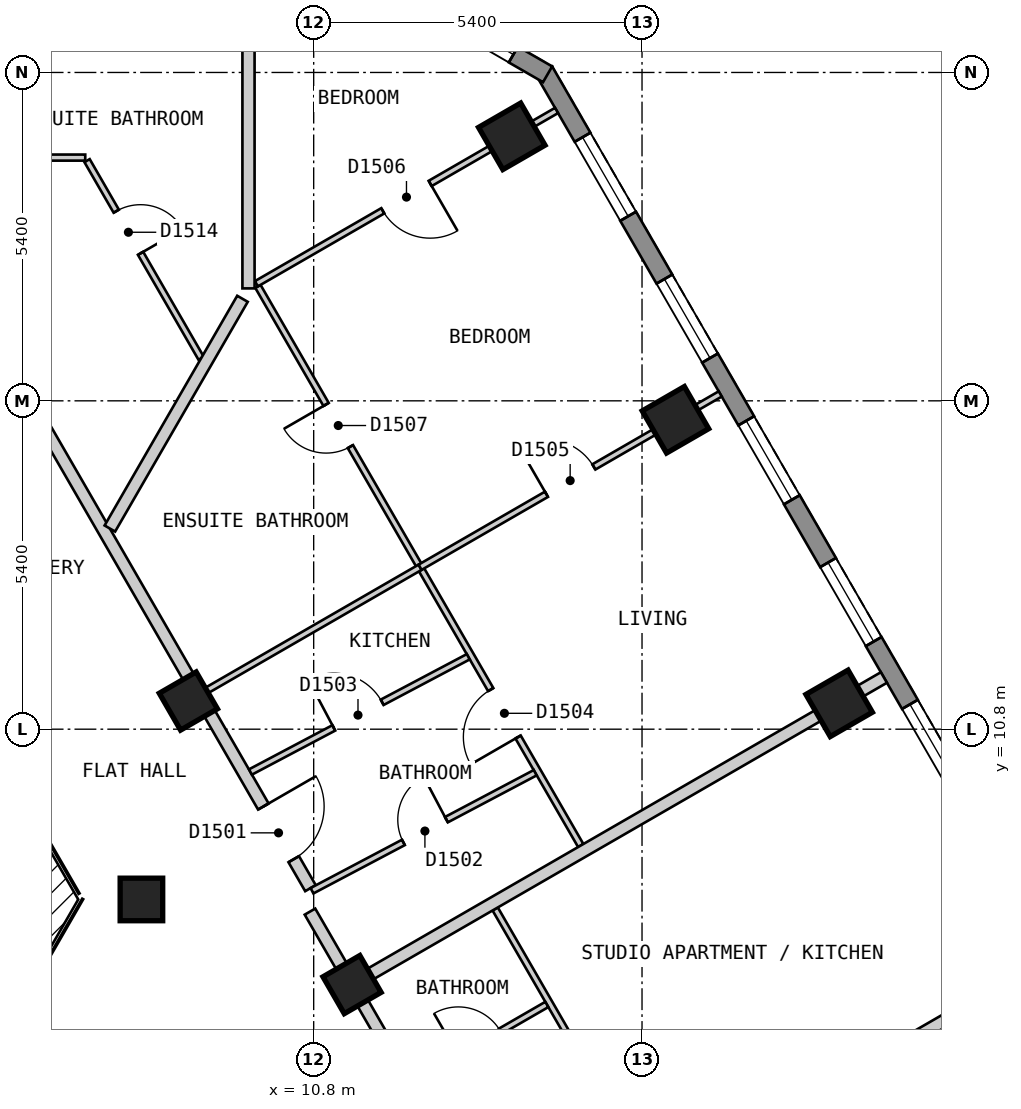
"""IFC4 building model, lengths in metres.
Left out: names, types, materials, properties, quantities, classifications, styles, units other than length and angle.
Written with IfcOpenShell. Run it as: python <this file> out.ifc"""

import sys

from ifc_helpers import new_model, si_unit, direction, frame, frame_2d, origin, origin_2d, place, context, subcontext, project, spatial, polyline, rectangle, outline, extrude, element, fill, save


model = new_model("IFC4")
c1 = context("Model", 3, precision=1e-05, world=origin(), true_north=direction((0.0, 1.0)))
c2 = subcontext(c1, "Body", "Model", "MODEL_VIEW")
j1 = project(units=[si_unit("LENGTHUNIT", "METRE"), si_unit("PLANEANGLEUNIT", "RADIAN")], contexts=[c1])
p1 = place(None, origin())
s1 = spatial("IfcSite", under=j1, at=p1, CompositionType="ELEMENT")
p2 = place(p1, origin())
s2 = spatial("IfcBuilding", under=s1, at=p2, CompositionType="ELEMENT")
p3 = place(p2, frame((0.0, 0.0, 190.2)))
s3 = spatial("IfcBuildingStorey", under=s2, at=p3, CompositionType="ELEMENT", Elevation=190.2)
for number, where, z_axis, x_axis in (
    (1, (19.442, 11.225, 0.0), (0.0, 0.0, 1.0), (-0.5, 0.866, 0.0)),
    (2, (16.75, 15.888, 0.0), (0.0, 0.0, 1.0), (-0.5, 0.866, 0.0)),
    (3, (14.058, 20.55, 0.0), (0.0, 0.0, 1.0), (-0.5, 0.866, 0.0)),
):
    element("IfcColumn", number, at=place(p3, frame(where, z_axis=z_axis, x_axis=x_axis)), inside=s3, PredefinedType="COLUMN", context=c2, shape_type="SweptSolid", body=[
        extrude(rectangle(XDim=0.8, YDim=0.8, at=origin_2d()), origin(), (0.0, 0.0, 1.0), 3.0),
    ])
for number, where, z_axis, x_axis in (
    (4, (11.431, 6.6, 0.0), (0.0, 0.0, 1.0), (-0.5, 0.866, 0.0)),
    (5, (7.967, 8.0, 0.0), (0.0, 0.0, 1.0), (1.0, 0.0, 0.0)),
    (6, (8.739, 11.263, 0.0), (0.0, 0.0, 1.0), (-0.5, 0.866, 0.0)),
):
    element("IfcColumn", number, at=place(p3, frame(where, z_axis=z_axis, x_axis=x_axis)), inside=s3, PredefinedType="COLUMN", context=c2, shape_type="SweptSolid", body=[
        extrude(rectangle(XDim=0.7, YDim=0.7, at=origin_2d()), origin(), (0.0, 0.0, 1.0), 3.0),
    ])
p4 = place(p3, frame((26.024, 1.825, 0.0), z_axis=(0.0, 0.0, 1.0), x_axis=(-0.500010537973, 0.866019319597, 0.0)))
e7 = element("IfcWall", 7, at=p4, inside=s3, PredefinedType="SOLIDWALL", context=c2, shape_type="SweptSolid", body=[
    extrude(outline(polyline([(0.0, -0.15), (22.863, -0.15), (22.783, 0.15), (0.08, 0.15), (0.0, -0.15)])), origin(), (0.0, 0.0, 1.0), 2.7),
])
p5 = place(p4, frame((1.259, 0.0, 0.15)))
e8 = element("IfcOpeningElement", 8, at=p5, cuts=e7, PredefinedType="OPENING", context=c2, shape_type="SweptSolid", body=[
    extrude(rectangle(XDim=1.5, YDim=2.1, at=frame_2d((0.75, 1.05))), frame((0.0, 0.16, 0.0), z_axis=(0.0, -1.0, 0.0), x_axis=(1.0, 0.0, 0.0)), (0.0, 0.0, 1.0), 0.32),
])
p6 = place(p4, frame((3.952, 0.0, 0.15)))
e9 = element("IfcOpeningElement", 9, at=p6, cuts=e7, PredefinedType="OPENING", context=c2, shape_type="SweptSolid", body=[
    extrude(rectangle(XDim=1.5, YDim=2.1, at=frame_2d((0.75, 1.05))), frame((0.0, 0.16, 0.0), z_axis=(0.0, -1.0, 0.0), x_axis=(1.0, 0.0, 0.0)), (0.0, 0.0, 1.0), 0.32),
])
p7 = place(p4, frame((6.644, 0.0, 0.15)))
e10 = element("IfcOpeningElement", 10, at=p7, cuts=e7, PredefinedType="OPENING", context=c2, shape_type="SweptSolid", body=[
    extrude(rectangle(XDim=1.5, YDim=2.1, at=frame_2d((0.75, 1.05))), frame((0.0, 0.16, 0.0), z_axis=(0.0, -1.0, 0.0), x_axis=(1.0, 0.0, 0.0)), (0.0, 0.0, 1.0), 0.32),
])
p8 = place(p4, frame((9.335, 0.0, 0.15)))
e11 = element("IfcOpeningElement", 11, at=p8, cuts=e7, PredefinedType="OPENING", context=c2, shape_type="SweptSolid", body=[
    extrude(rectangle(XDim=1.5, YDim=2.1, at=frame_2d((0.75, 1.05))), frame((0.0, 0.16, 0.0), z_axis=(0.0, -1.0, 0.0), x_axis=(1.0, 0.0, 0.0)), (0.0, 0.0, 1.0), 0.32),
])
p9 = place(p4, frame((12.028, 0.0, 0.15)))
e12 = element("IfcOpeningElement", 12, at=p9, cuts=e7, PredefinedType="OPENING", context=c2, shape_type="SweptSolid", body=[
    extrude(rectangle(XDim=1.5, YDim=2.1, at=frame_2d((0.75, 1.05))), frame((0.0, 0.16, 0.0), z_axis=(0.0, -1.0, 0.0), x_axis=(1.0, 0.0, 0.0)), (0.0, 0.0, 1.0), 0.32),
])
p10 = place(p4, frame((14.72, 0.0, 0.15)))
e13 = element("IfcOpeningElement", 13, at=p10, cuts=e7, PredefinedType="OPENING", context=c2, shape_type="SweptSolid", body=[
    extrude(rectangle(XDim=1.5, YDim=2.1, at=frame_2d((0.75, 1.05))), frame((0.0, 0.16, 0.0), z_axis=(0.0, -1.0, 0.0), x_axis=(1.0, 0.0, 0.0)), (0.0, 0.0, 1.0), 0.32),
])
p11 = place(p4, frame((17.411, 0.0, 0.15)))
e14 = element("IfcOpeningElement", 14, at=p11, cuts=e7, PredefinedType="OPENING", context=c2, shape_type="SweptSolid", body=[
    extrude(rectangle(XDim=1.5, YDim=2.1, at=frame_2d((0.75, 1.05))), frame((0.0, 0.16, 0.0), z_axis=(0.0, -1.0, 0.0), x_axis=(1.0, 0.0, 0.0)), (0.0, 0.0, 1.0), 0.32),
])
p12 = place(p4, frame((20.104, 0.0, 0.15)))
e15 = element("IfcOpeningElement", 15, at=p12, cuts=e7, PredefinedType="OPENING", context=c2, shape_type="SweptSolid", body=[
    extrude(rectangle(XDim=1.5, YDim=2.1, at=frame_2d((0.75, 1.05))), frame((0.0, 0.16, 0.0), z_axis=(0.0, -1.0, 0.0), x_axis=(1.0, 0.0, 0.0)), (0.0, 0.0, 1.0), 0.32),
])
p13 = place(p3, frame((14.647, 21.57, 0.0), z_axis=(0.0, 0.0, 1.0), x_axis=(-0.866022959057, 0.500004234368, 0.0)))
e16 = element("IfcWall", 16, at=p13, inside=s3, PredefinedType="SOLIDWALL", context=c2, shape_type="SweptSolid", body=[
    extrude(outline(polyline([(0.0, -0.15), (5.0, -0.15), (4.92, 0.15), (0.08, 0.15), (0.0, -0.15)])), origin(), (0.0, 0.0, 1.0), 2.7),
])
p14 = place(p13, frame((0.65, 0.0, 0.15)))
e17 = element("IfcOpeningElement", 17, at=p14, cuts=e16, PredefinedType="OPENING", context=c2, shape_type="SweptSolid", body=[
    extrude(rectangle(XDim=1.2, YDim=2.1, at=frame_2d((0.6, 1.05))), frame((0.0, 0.16, 0.0), z_axis=(0.0, -1.0, 0.0), x_axis=(1.0, 0.0, 0.0)), (0.0, 0.0, 1.0), 0.32),
])
p15 = place(p13, frame((3.15, 0.0, 0.15)))
e18 = element("IfcOpeningElement", 18, at=p15, cuts=e16, PredefinedType="OPENING", context=c2, shape_type="SweptSolid", body=[
    extrude(rectangle(XDim=1.2, YDim=2.1, at=frame_2d((0.6, 1.05))), frame((0.0, 0.16, 0.0), z_axis=(0.0, -1.0, 0.0), x_axis=(1.0, 0.0, 0.0)), (0.0, 0.0, 1.0), 0.32),
])
p16 = place(p3, frame((10.739, 7.8, 0.0), z_axis=(0.0, 0.0, 1.0), x_axis=(0.500023726918, -0.866011704609, 0.0)))
e19 = element("IfcWall", 19, at=p16, inside=s3, PredefinedType="PARTITIONING", context=c2, shape_type="SweptSolid", body=[
    extrude(rectangle(XDim=9.47, YDim=0.2, at=frame_2d((4.735, 0.0))), origin(), (0.0, 0.0, 1.0), 2.7),
])
p17 = place(p16, frame((8.168, 0.0, 0.0)))
e20 = element("IfcOpeningElement", 20, at=p17, cuts=e19, PredefinedType="OPENING", context=c2, shape_type="SweptSolid", body=[
    extrude(rectangle(XDim=1.0, YDim=2.1, at=frame_2d((0.5, 1.05))), frame((0.0, 0.11, 0.0), z_axis=(0.0, -1.0, 0.0), x_axis=(1.0, 0.0, 0.0)), (0.0, 0.0, 1.0), 0.22),
])
p18 = place(p16, frame((3.578, 0.0, 0.0)))
e21 = element("IfcOpeningElement", 21, at=p18, cuts=e19, PredefinedType="OPENING", context=c2, shape_type="SweptSolid", body=[
    extrude(rectangle(XDim=1.0, YDim=2.1, at=frame_2d((0.5, 1.05))), frame((0.0, 0.11, 0.0), z_axis=(0.0, -1.0, 0.0), x_axis=(1.0, 0.0, 0.0)), (0.0, 0.0, 1.0), 0.22),
])
p19 = place(p3, frame((5.485, 17.3, 0.0), z_axis=(0.0, 0.0, 1.0), x_axis=(0.499998905622, -0.866026035623, 0.0)))
e22 = element("IfcWall", 22, at=p19, inside=s3, PredefinedType="PARTITIONING", context=c2, shape_type="SweptSolid", body=[
    extrude(rectangle(XDim=10.524, YDim=0.2, at=frame_2d((5.262, 0.0))), origin(), (0.0, 0.0, 1.0), 2.7),
])
p20 = place(p19, frame((8.974, 0.0, 0.0)))
e23 = element("IfcOpeningElement", 23, at=p20, cuts=e22, PredefinedType="OPENING", context=c2, shape_type="SweptSolid", body=[
    extrude(rectangle(XDim=1.0, YDim=2.1, at=frame_2d((0.5, 1.05))), frame((0.0, 0.11, 0.0), z_axis=(0.0, -1.0, 0.0), x_axis=(1.0, 0.0, 0.0)), (0.0, 0.0, 1.0), 0.22),
])
p21 = place(p3, frame((13.785, 7.844, 0.0), z_axis=(0.0, 0.0, 1.0), x_axis=(0.500176784828, -0.865923312955, 0.0)))
e24 = element("IfcWall", 24, at=p21, inside=s3, PredefinedType="PARTITIONING", context=c2, shape_type="SweptSolid", body=[
    extrude(rectangle(XDim=3.349, YDim=0.1, at=frame_2d((1.674, 0.0))), origin(), (0.0, 0.0, 1.0), 2.7),
])
p22 = place(p3, frame((7.073, 20.15, 0.0), z_axis=(0.0, 0.0, 1.0), x_axis=(0.499917691695, -0.866072919292, 0.0)))
e25 = element("IfcWall", 25, at=p22, inside=s3, PredefinedType="PARTITIONING", context=c2, shape_type="SweptSolid", body=[
    extrude(rectangle(XDim=3.753, YDim=0.1, at=frame_2d((1.876, 0.0))), origin(), (0.0, 0.0, 1.0), 2.7),
])
p23 = place(p22, frame((0.96, 0.0, 0.0)))
e26 = element("IfcOpeningElement", 26, at=p23, cuts=e25, PredefinedType="OPENING", context=c2, shape_type="SweptSolid", body=[
    extrude(rectangle(XDim=0.8, YDim=2.1, at=frame_2d((0.4, 1.05))), frame((0.0, 0.06, 0.0), z_axis=(0.0, -1.0, 0.0), x_axis=(1.0, 0.0, 0.0)), (0.0, 0.0, 1.0), 0.12),
])
p24 = place(p3, frame((9.883, 18.082, 0.0), z_axis=(0.0, 0.0, 1.0), x_axis=(0.500004428835, -0.86602284678, 0.0)))
e27 = element("IfcWall", 27, at=p24, inside=s3, PredefinedType="PARTITIONING", context=c2, shape_type="SweptSolid", body=[
    extrude(rectangle(XDim=10.618, YDim=0.1, at=frame_2d((5.309, 0.0))), origin(), (0.0, 0.0, 1.0), 2.7),
])
p25 = place(p24, frame((7.657, 0.0, 0.0)))
e28 = element("IfcOpeningElement", 28, at=p25, cuts=e27, PredefinedType="OPENING", context=c2, shape_type="SweptSolid", body=[
    extrude(rectangle(XDim=0.9, YDim=2.1, at=frame_2d((0.45, 1.05))), frame((0.0, 0.06, 0.0), z_axis=(0.0, -1.0, 0.0), x_axis=(1.0, 0.0, 0.0)), (0.0, 0.0, 1.0), 0.12),
])
p26 = place(p24, frame((2.242, 0.0, 0.0)))
e29 = element("IfcOpeningElement", 29, at=p26, cuts=e27, PredefinedType="OPENING", context=c2, shape_type="SweptSolid", body=[
    extrude(rectangle(XDim=0.8, YDim=2.1, at=frame_2d((0.4, 1.05))), frame((0.0, 0.06, 0.0), z_axis=(0.0, -1.0, 0.0), x_axis=(1.0, 0.0, 0.0)), (0.0, 0.0, 1.0), 0.12),
])
p27 = place(p3, frame((0.05, 20.2, 0.0), z_axis=(0.0, 0.0, 1.0), x_axis=(1.0, 0.0, 0.0)))
e30 = element("IfcWall", 30, at=p27, inside=s3, PredefinedType="PARTITIONING", context=c2, shape_type="SweptSolid", body=[
    extrude(rectangle(XDim=6.993, YDim=0.1, at=frame_2d((3.497, 0.0))), origin(), (0.0, 0.0, 1.0), 2.7),
])
p28 = place(p27, frame((1.982, 0.0, 0.0)))
e31 = element("IfcOpeningElement", 31, at=p28, cuts=e30, PredefinedType="OPENING", context=c2, shape_type="SweptSolid", body=[
    extrude(rectangle(XDim=0.8, YDim=2.1, at=frame_2d((0.4, 1.05))), frame((0.0, 0.06, 0.0), z_axis=(0.0, -1.0, 0.0), x_axis=(1.0, 0.0, 0.0)), (0.0, 0.0, 1.0), 0.12),
])
p29 = place(p3, frame((9.76, 10.096, 0.0), z_axis=(0.0, 0.0, 1.0), x_axis=(0.883925629136, 0.467627503636, 0.0)))
e32 = element("IfcWall", 32, at=p29, inside=s3, PredefinedType="PARTITIONING", context=c2, shape_type="SweptSolid", body=[
    extrude(rectangle(XDim=4.052, YDim=0.1, at=frame_2d((2.026, 0.0))), origin(), (0.0, 0.0, 1.0), 2.7),
])
p30 = place(p29, frame((1.551, 0.0, 0.0)))
e33 = element("IfcOpeningElement", 33, at=p30, cuts=e32, PredefinedType="OPENING", context=c2, shape_type="SweptSolid", body=[
    extrude(rectangle(XDim=0.9, YDim=2.1, at=frame_2d((0.45, 1.05))), frame((0.0, 0.06, 0.0), z_axis=(0.0, -1.0, 0.0), x_axis=(1.0, 0.0, 0.0)), (0.0, 0.0, 1.0), 0.12),
])
p31 = place(p3, frame((10.772, 8.143, 0.0), z_axis=(0.0, 0.0, 1.0), x_axis=(0.884049480227, 0.467393320995, 0.0)))
e34 = element("IfcWall", 34, at=p31, inside=s3, PredefinedType="PARTITIONING", context=c2, shape_type="SweptSolid", body=[
    extrude(rectangle(XDim=4.153, YDim=0.1, at=frame_2d((2.076, 0.0))), origin(), (0.0, 0.0, 1.0), 2.7),
])
p32 = place(p31, frame((1.701, 0.0, 0.0)))
e35 = element("IfcOpeningElement", 35, at=p32, cuts=e34, PredefinedType="OPENING", context=c2, shape_type="SweptSolid", body=[
    extrude(rectangle(XDim=0.8, YDim=2.1, at=frame_2d((0.4, 1.05))), frame((0.0, 0.06, 0.0), z_axis=(0.0, -1.0, 0.0), x_axis=(1.0, 0.0, 0.0)), (0.0, 0.0, 1.0), 0.12),
])
p33 = place(p3, frame((12.46, 5.018, 0.0), z_axis=(0.0, 0.0, 1.0), x_axis=(0.866080321209, 0.499904868165, 0.0)))
e36 = element("IfcWall", 36, at=p33, inside=s3, PredefinedType="PARTITIONING", context=c2, shape_type="SweptSolid", body=[
    extrude(rectangle(XDim=2.51, YDim=0.1, at=frame_2d((1.255, 0.0))), origin(), (0.0, 0.0, 1.0), 2.7),
])
p34 = place(p33, frame((0.83, 0.0, 0.0)))
e37 = element("IfcOpeningElement", 37, at=p34, cuts=e36, PredefinedType="OPENING", context=c2, shape_type="SweptSolid", body=[
    extrude(rectangle(XDim=0.8, YDim=2.1, at=frame_2d((0.4, 1.05))), frame((0.0, 0.06, 0.0), z_axis=(0.0, -1.0, 0.0), x_axis=(1.0, 0.0, 0.0)), (0.0, 0.0, 1.0), 0.12),
])
p35 = place(p3, frame((8.999, 11.413, 0.0), z_axis=(0.0, 0.0, 1.0), x_axis=(0.86606561423, 0.499930346997, 0.0)))
e38 = element("IfcWall", 38, at=p35, inside=s3, PredefinedType="PARTITIONING", context=c2, shape_type="SweptSolid", body=[
    extrude(rectangle(XDim=4.1, YDim=0.1, at=frame_2d((2.05, 0.0))), origin(), (0.0, 0.0, 1.0), 2.7),
])
p36 = place(p3, frame((9.858, 18.125, 0.0), z_axis=(0.0, 0.0, 1.0), x_axis=(0.866004402611, 0.500036373335, 0.0)))
e39 = element("IfcWall", 39, at=p36, inside=s3, PredefinedType="PARTITIONING", context=c2, shape_type="SweptSolid", body=[
    extrude(rectangle(XDim=5.7, YDim=0.1, at=frame_2d((2.85, 0.0))), origin(), (0.0, 0.0, 1.0), 2.7),
])
p37 = place(p36, frame((2.4, 0.0, 0.0)))
e40 = element("IfcOpeningElement", 40, at=p37, cuts=e39, PredefinedType="OPENING", context=c2, shape_type="SweptSolid", body=[
    extrude(rectangle(XDim=0.9, YDim=2.1, at=frame_2d((0.45, 1.05))), frame((0.0, 0.06, 0.0), z_axis=(0.0, -1.0, 0.0), x_axis=(1.0, 0.0, 0.0)), (0.0, 0.0, 1.0), 0.12),
])
p38 = place(p3, frame((7.448, 14.1, 0.0), z_axis=(0.0, 0.0, 1.0), x_axis=(0.499961462843, 0.866047652079, 0.0)))
e41 = element("IfcWall", 41, at=p38, inside=s3, PredefinedType="PARTITIONING", context=c2, shape_type="SweptSolid", body=[
    extrude(rectangle(XDim=4.362, YDim=0.2, at=frame_2d((2.181, 0.0))), origin(), (0.0, 0.0, 1.0), 2.7),
])
p39 = place(p3, frame((9.728, 18.049, 0.0), z_axis=(0.0, 0.0, 1.0), x_axis=(0.0, 1.0, 0.0)))
e42 = element("IfcWall", 42, at=p39, inside=s3, PredefinedType="PARTITIONING", context=c2, shape_type="SweptSolid", body=[
    extrude(rectangle(XDim=5.851, YDim=0.2, at=frame_2d((2.925, 0.0))), origin(), (0.0, 0.0, 1.0), 2.7),
])
p40 = place(p3, frame((14.21, 1.987, 0.0), z_axis=(0.0, 0.0, 1.0), x_axis=(0.866022959057, 0.500004234368, 0.0)))
e43 = element("IfcWall", 43, at=p40, inside=s3, PredefinedType="PARTITIONING", context=c2, shape_type="SweptSolid", body=[
    extrude(rectangle(XDim=10.0, YDim=0.2, at=frame_2d((5.0, 0.0))), origin(), (0.0, 0.0, 1.0), 2.7),
])
p41 = place(p3, frame((11.518, 6.65, 0.0), z_axis=(0.0, 0.0, 1.0), x_axis=(0.866016855193, 0.500014806302, 0.0)))
e44 = element("IfcWall", 44, at=p41, inside=s3, PredefinedType="PARTITIONING", context=c2, shape_type="SweptSolid", body=[
    extrude(rectangle(XDim=10.0, YDim=0.2, at=frame_2d((5.0, 0.0))), origin(), (0.0, 0.0, 1.0), 2.7),
])
p42 = place(p3, frame((12.55, 13.463, 0.0), z_axis=(0.0, 0.0, 1.0), x_axis=(0.866004402611, 0.500036373335, 0.0)))
e45 = element("IfcWall", 45, at=p42, inside=s3, PredefinedType="PARTITIONING", context=c2, shape_type="SweptSolid", body=[
    extrude(rectangle(XDim=5.7, YDim=0.1, at=frame_2d((2.85, 0.0))), origin(), (0.0, 0.0, 1.0), 2.7),
])
p43 = place(p42, frame((2.4, 0.0, 0.0)))
e46 = element("IfcOpeningElement", 46, at=p43, cuts=e45, PredefinedType="OPENING", context=c2, shape_type="SweptSolid", body=[
    extrude(rectangle(XDim=0.9, YDim=2.1, at=frame_2d((0.45, 1.05))), frame((0.0, 0.06, 0.0), z_axis=(0.0, -1.0, 0.0), x_axis=(1.0, 0.0, 0.0)), (0.0, 0.0, 1.0), 0.12),
])
p44 = place(p8, origin())
e47 = element("IfcWindow", 47, at=p44, inside=s3, PartitioningType="SINGLE_PANEL", PredefinedType="WINDOW", context=c2, shape_type="SweptSolid", body=[
    extrude(rectangle(XDim=1.5, YDim=2.1, at=frame_2d((0.75, 1.05))), frame((0.0, 0.03, 0.0), z_axis=(0.0, -1.0, 0.0), x_axis=(1.0, 0.0, 0.0)), (0.0, 0.0, 1.0), 0.06),
])
fill(e11, e47)
p45 = place(p9, origin())
e48 = element("IfcWindow", 48, at=p45, inside=s3, PartitioningType="SINGLE_PANEL", PredefinedType="WINDOW", context=c2, shape_type="SweptSolid", body=[
    extrude(rectangle(XDim=1.5, YDim=2.1, at=frame_2d((0.75, 1.05))), frame((0.0, 0.03, 0.0), z_axis=(0.0, -1.0, 0.0), x_axis=(1.0, 0.0, 0.0)), (0.0, 0.0, 1.0), 0.06),
])
fill(e12, e48)
p46 = place(p10, origin())
e49 = element("IfcWindow", 49, at=p46, inside=s3, PartitioningType="SINGLE_PANEL", PredefinedType="WINDOW", context=c2, shape_type="SweptSolid", body=[
    extrude(rectangle(XDim=1.5, YDim=2.1, at=frame_2d((0.75, 1.05))), frame((0.0, 0.03, 0.0), z_axis=(0.0, -1.0, 0.0), x_axis=(1.0, 0.0, 0.0)), (0.0, 0.0, 1.0), 0.06),
])
fill(e13, e49)
p47 = place(p11, origin())
e50 = element("IfcWindow", 50, at=p47, inside=s3, PartitioningType="SINGLE_PANEL", PredefinedType="WINDOW", context=c2, shape_type="SweptSolid", body=[
    extrude(rectangle(XDim=1.5, YDim=2.1, at=frame_2d((0.75, 1.05))), frame((0.0, 0.03, 0.0), z_axis=(0.0, -1.0, 0.0), x_axis=(1.0, 0.0, 0.0)), (0.0, 0.0, 1.0), 0.06),
])
fill(e14, e50)
p48 = place(p12, origin())
e51 = element("IfcWindow", 51, at=p48, inside=s3, PartitioningType="SINGLE_PANEL", PredefinedType="WINDOW", context=c2, shape_type="SweptSolid", body=[
    extrude(rectangle(XDim=1.5, YDim=2.1, at=frame_2d((0.75, 1.05))), frame((0.0, 0.03, 0.0), z_axis=(0.0, -1.0, 0.0), x_axis=(1.0, 0.0, 0.0)), (0.0, 0.0, 1.0), 0.06),
])
fill(e15, e51)
p49 = place(p14, origin())
e52 = element("IfcWindow", 52, at=p49, inside=s3, PartitioningType="SINGLE_PANEL", PredefinedType="WINDOW", context=c2, shape_type="SweptSolid", body=[
    extrude(rectangle(XDim=1.2, YDim=2.1, at=frame_2d((0.6, 1.05))), frame((0.0, 0.03, 0.0), z_axis=(0.0, -1.0, 0.0), x_axis=(1.0, 0.0, 0.0)), (0.0, 0.0, 1.0), 0.06),
])
fill(e17, e52)
p50 = place(p20, origin())
e53 = element("IfcDoor", 53, at=p50, inside=s3, OperationType="SINGLE_SWING_LEFT", PredefinedType="DOOR", context=c2, shape_type="SweptSolid", body=[
    extrude(rectangle(XDim=1.0, YDim=2.1, at=frame_2d((0.5, 1.05))), frame((0.0, 0.025, 0.0), z_axis=(0.0, -1.0, 0.0), x_axis=(1.0, 0.0, 0.0)), (0.0, 0.0, 1.0), 0.05),
])
fill(e23, e53)
p51 = place(p32, origin())
e54 = element("IfcDoor", 54, at=p51, inside=s3, OperationType="SINGLE_SWING_RIGHT", PredefinedType="DOOR", context=c2, shape_type="SweptSolid", body=[
    extrude(rectangle(XDim=0.8, YDim=2.1, at=frame_2d((0.4, 1.05))), frame((0.0, 0.025, 0.0), z_axis=(0.0, -1.0, 0.0), x_axis=(1.0, 0.0, 0.0)), (0.0, 0.0, 1.0), 0.05),
])
fill(e35, e54)
p52 = place(p30, origin())
e55 = element("IfcDoor", 55, at=p52, inside=s3, OperationType="SINGLE_SWING_LEFT", PredefinedType="DOOR", context=c2, shape_type="SweptSolid", body=[
    extrude(rectangle(XDim=0.9, YDim=2.1, at=frame_2d((0.45, 1.05))), frame((0.0, 0.025, 0.0), z_axis=(0.0, -1.0, 0.0), x_axis=(1.0, 0.0, 0.0)), (0.0, 0.0, 1.0), 0.05),
])
fill(e33, e55)
p53 = place(p25, origin())
e56 = element("IfcDoor", 56, at=p53, inside=s3, OperationType="SINGLE_SWING_RIGHT", PredefinedType="DOOR", context=c2, shape_type="SweptSolid", body=[
    extrude(rectangle(XDim=0.9, YDim=2.1, at=frame_2d((0.45, 1.05))), frame((0.0, 0.025, 0.0), z_axis=(0.0, -1.0, 0.0), x_axis=(1.0, 0.0, 0.0)), (0.0, 0.0, 1.0), 0.05),
])
fill(e28, e56)
p54 = place(p43, origin())
e57 = element("IfcDoor", 57, at=p54, inside=s3, OperationType="SINGLE_SWING_LEFT", PredefinedType="DOOR", context=c2, shape_type="SweptSolid", body=[
    extrude(rectangle(XDim=0.9, YDim=2.1, at=frame_2d((0.45, 1.05))), frame((0.0, 0.025, 0.0), z_axis=(0.0, -1.0, 0.0), x_axis=(1.0, 0.0, 0.0)), (0.0, 0.0, 1.0), 0.05),
])
fill(e46, e57)
p55 = place(p37, origin())
e58 = element("IfcDoor", 58, at=p55, inside=s3, OperationType="SINGLE_SWING_RIGHT", PredefinedType="DOOR", context=c2, shape_type="SweptSolid", body=[
    extrude(rectangle(XDim=0.9, YDim=2.1, at=frame_2d((0.45, 1.05))), frame((0.0, 0.025, 0.0), z_axis=(0.0, -1.0, 0.0), x_axis=(1.0, 0.0, 0.0)), (0.0, 0.0, 1.0), 0.05),
])
fill(e40, e58)
p56 = place(p26, origin())
e59 = element("IfcDoor", 59, at=p56, inside=s3, OperationType="SINGLE_SWING_LEFT", PredefinedType="DOOR", context=c2, shape_type="SweptSolid", body=[
    extrude(rectangle(XDim=0.8, YDim=2.1, at=frame_2d((0.4, 1.05))), frame((0.0, 0.025, 0.0), z_axis=(0.0, -1.0, 0.0), x_axis=(1.0, 0.0, 0.0)), (0.0, 0.0, 1.0), 0.05),
])
fill(e29, e59)
p57 = place(p23, origin())
e60 = element("IfcDoor", 60, at=p57, inside=s3, OperationType="SINGLE_SWING_RIGHT", PredefinedType="DOOR", context=c2, shape_type="SweptSolid", body=[
    extrude(rectangle(XDim=0.8, YDim=2.1, at=frame_2d((0.4, 1.05))), frame((0.0, 0.025, 0.0), z_axis=(0.0, -1.0, 0.0), x_axis=(1.0, 0.0, 0.0)), (0.0, 0.0, 1.0), 0.05),
])
fill(e26, e60)
save(model, sys.argv[1])
